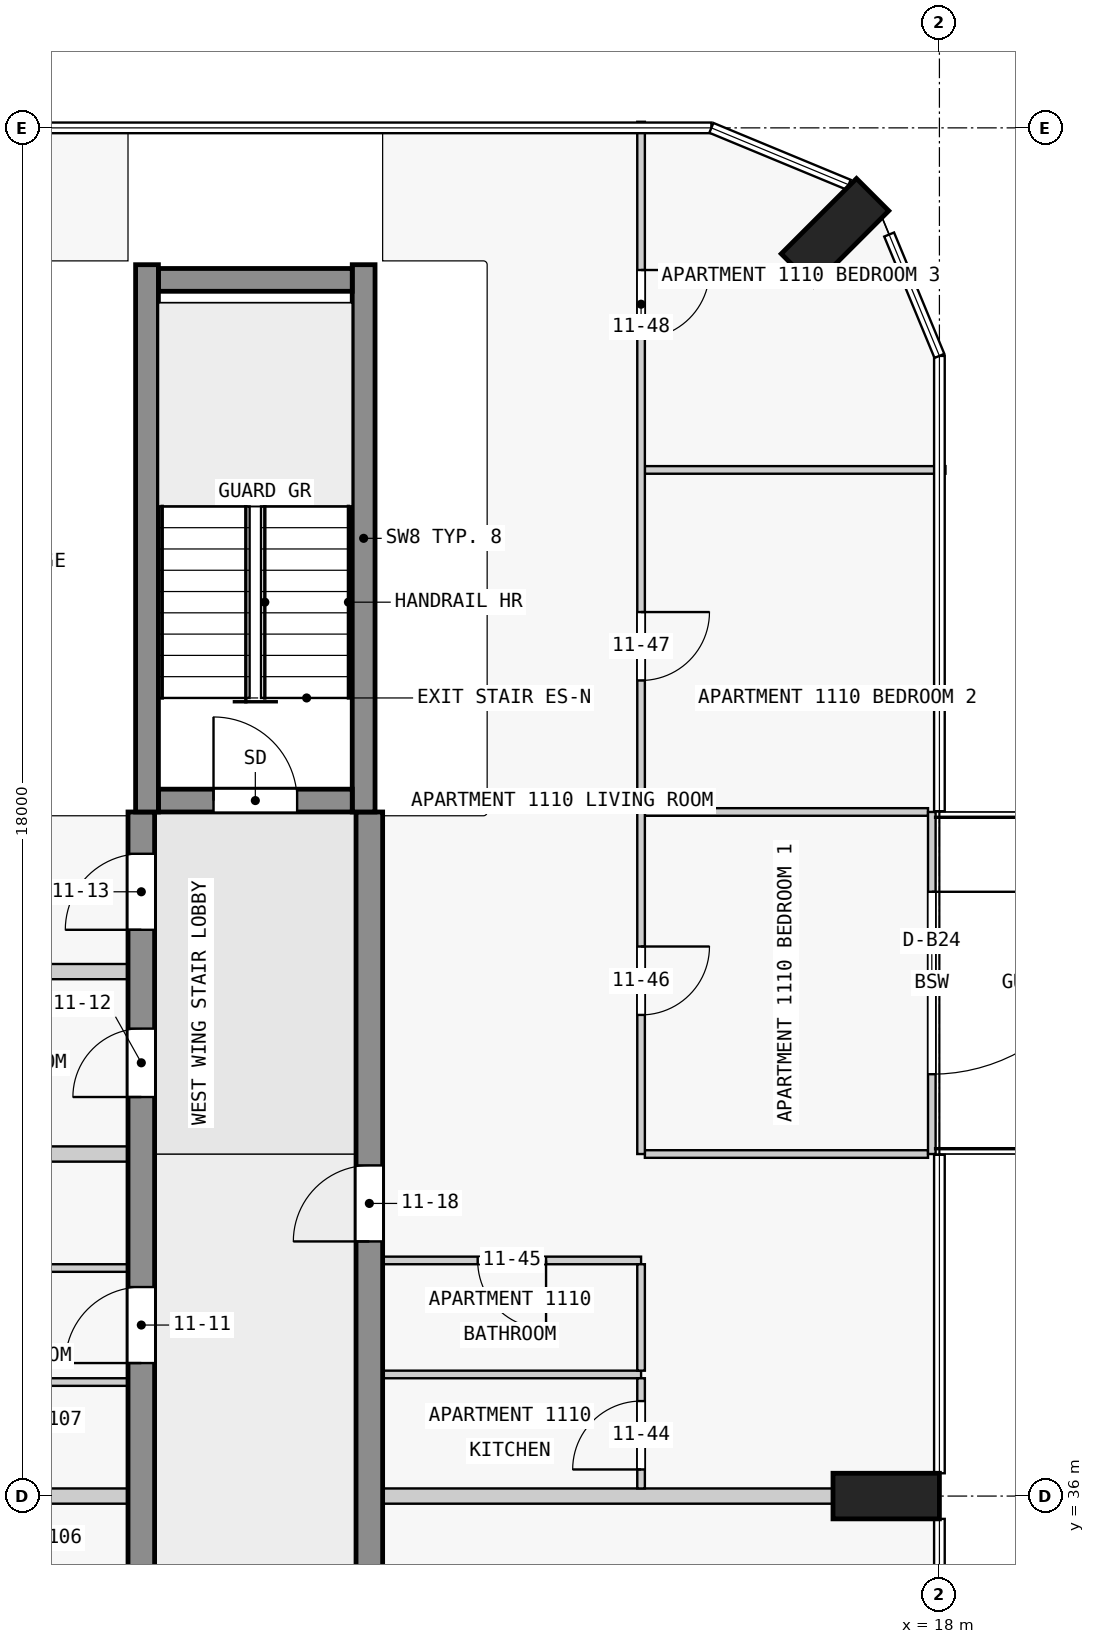
"""IFC4 building model, lengths in metres.
Left out: names, types, materials, properties, quantities, classifications, styles, units other than length and angle.
Written with IfcOpenShell. Run it as: python <this file> out.ifc"""

import sys

from ifc_helpers import new_model, si_unit, direction, frame, frame_2d, origin, origin_2d, place, context, subcontext, project, spatial, rectangle, extrude, element, fill, save


model = new_model("IFC4")
c1 = context("Model", 3, precision=1e-05, world=origin(), true_north=direction((0.0, 1.0)))
c2 = subcontext(c1, "Body", "Model", "MODEL_VIEW")
j1 = project(units=[si_unit("LENGTHUNIT", "METRE"), si_unit("PLANEANGLEUNIT", "RADIAN")], contexts=[c1])
p1 = place(None, origin())
s1 = spatial("IfcSite", under=j1, at=p1, CompositionType="ELEMENT")
p2 = place(p1, origin())
s2 = spatial("IfcBuilding", under=s1, at=p2, CompositionType="ELEMENT")
p3 = place(p2, frame((0.0, 0.0, 47.8)))
s3 = spatial("IfcBuildingStorey", under=s2, at=p3, CompositionType="ELEMENT", Elevation=47.8)
for number, where, z_axis, x_axis in (
    (1, (17.3, 36.0, 0.0), (0.0, 0.0, 1.0), (0.0, 1.0, 0.0)),
    (2, (16.626, 52.626, 0.0), (0.0, 0.0, 1.0), (-0.707, 0.707, 0.0)),
):
    element("IfcColumn", number, at=place(p3, frame(where, z_axis=z_axis, x_axis=x_axis)), inside=s3, PredefinedType="COLUMN", context=c2, shape_type="SweptSolid", body=[
        extrude(rectangle(XDim=0.6, YDim=1.4, at=origin_2d()), origin(), (0.0, 0.0, 1.0), 3.5),
    ])
p4 = place(p3, frame((7.725, 45.15, 0.0), z_axis=(0.0, 0.0, 1.0), x_axis=(1.0, 0.0, 0.0)))
e3 = element("IfcWall", 3, at=p4, inside=s3, PredefinedType="SHEAR", context=c2, shape_type="SweptSolid", body=[
    extrude(rectangle(XDim=2.55, YDim=0.3, at=frame_2d((1.275, 0.0))), origin(), (0.0, 0.0, 1.0), 3.5),
])
p5 = place(p4, frame((0.725, 0.0, 0.0)))
e4 = element("IfcOpeningElement", 4, at=p5, cuts=e3, PredefinedType="OPENING", context=c2, shape_type="SweptSolid", body=[
    extrude(rectangle(XDim=1.1, YDim=2.1, at=frame_2d((0.55, 1.05))), frame((0.0, 0.16, 0.0), z_axis=(0.0, -1.0, 0.0), x_axis=(1.0, 0.0, 0.0)), (0.0, 0.0, 1.0), 0.32),
])
p6 = place(p3, frame((7.725, 52.0, 0.0), z_axis=(0.0, 0.0, 1.0), x_axis=(1.0, 0.0, 0.0)))
e5 = element("IfcWall", 5, at=p6, inside=s3, PredefinedType="SHEAR", context=c2, shape_type="SweptSolid", body=[
    extrude(rectangle(XDim=2.55, YDim=0.3, at=frame_2d((1.275, 0.0))), origin(), (0.0, 0.0, 1.0), 3.5),
])
for number, where, z_axis, x_axis in (
    (6, (7.575, 45.0, 0.0), (0.0, 0.0, 1.0), (0.0, 1.0, 0.0)),
    (7, (10.425, 45.0, 0.0), (0.0, 0.0, 1.0), (0.0, 1.0, 0.0)),
):
    element("IfcWall", number, at=place(p3, frame(where, z_axis=z_axis, x_axis=x_axis)), inside=s3, PredefinedType="SHEAR", context=c2, shape_type="SweptSolid", body=[
        extrude(rectangle(XDim=7.2, YDim=0.3, at=frame_2d((3.6, 0.0))), origin(), (0.0, 0.0, 1.0), 3.5),
    ])
p7 = place(p3, frame((7.5, 18.0, 0.0), z_axis=(0.0, 0.0, 1.0), x_axis=(0.0, 1.0, 0.0)))
e8 = element("IfcWall", 8, at=p7, inside=s3, PredefinedType="SHEAR", context=c2, shape_type="SweptSolid", body=[
    extrude(rectangle(XDim=27.0, YDim=0.35, at=frame_2d((13.5, 0.0))), origin(), (0.0, 0.0, 1.0), 3.25),
])
p8 = place(p7, frame((4.75, 0.0, 0.0)))
e9 = element("IfcOpeningElement", 9, at=p8, cuts=e8, PredefinedType="OPENING", context=c2, shape_type="SweptSolid", body=[
    extrude(rectangle(XDim=1.0, YDim=2.1, at=frame_2d((0.5, 1.05))), frame((0.0, 0.185, 0.0), z_axis=(0.0, -1.0, 0.0), x_axis=(1.0, 0.0, 0.0)), (0.0, 0.0, 1.0), 0.37),
])
p9 = place(p7, frame((15.25, 0.0, 0.0)))
e10 = element("IfcOpeningElement", 10, at=p9, cuts=e8, PredefinedType="OPENING", context=c2, shape_type="SweptSolid", body=[
    extrude(rectangle(XDim=1.0, YDim=2.1, at=frame_2d((0.5, 1.05))), frame((0.0, 0.185, 0.0), z_axis=(0.0, -1.0, 0.0), x_axis=(1.0, 0.0, 0.0)), (0.0, 0.0, 1.0), 0.37),
])
p10 = place(p7, frame((19.75, 0.0, 0.0)))
e11 = element("IfcOpeningElement", 11, at=p10, cuts=e8, PredefinedType="OPENING", context=c2, shape_type="SweptSolid", body=[
    extrude(rectangle(XDim=1.0, YDim=2.1, at=frame_2d((0.5, 1.05))), frame((0.0, 0.185, 0.0), z_axis=(0.0, -1.0, 0.0), x_axis=(1.0, 0.0, 0.0)), (0.0, 0.0, 1.0), 0.37),
])
p11 = place(p7, frame((23.25, 0.0, 0.0)))
e12 = element("IfcOpeningElement", 12, at=p11, cuts=e8, PredefinedType="OPENING", context=c2, shape_type="SweptSolid", body=[
    extrude(rectangle(XDim=0.9, YDim=2.1, at=frame_2d((0.45, 1.05))), frame((0.0, 0.185, 0.0), z_axis=(0.0, -1.0, 0.0), x_axis=(1.0, 0.0, 0.0)), (0.0, 0.0, 1.0), 0.37),
])
p12 = place(p7, frame((25.45, 0.0, 0.0)))
e13 = element("IfcOpeningElement", 13, at=p12, cuts=e8, PredefinedType="OPENING", context=c2, shape_type="SweptSolid", body=[
    extrude(rectangle(XDim=1.0, YDim=2.1, at=frame_2d((0.5, 1.05))), frame((0.0, 0.185, 0.0), z_axis=(0.0, -1.0, 0.0), x_axis=(1.0, 0.0, 0.0)), (0.0, 0.0, 1.0), 0.37),
])
p13 = place(p3, frame((10.5, 18.0, 0.0), z_axis=(0.0, 0.0, 1.0), x_axis=(0.0, 1.0, 0.0)))
e14 = element("IfcWall", 14, at=p13, inside=s3, PredefinedType="SHEAR", context=c2, shape_type="SweptSolid", body=[
    extrude(rectangle(XDim=27.0, YDim=0.35, at=frame_2d((13.5, 0.0))), origin(), (0.0, 0.0, 1.0), 3.25),
])
p14 = place(p13, frame((1.75, 0.0, 0.0)))
e15 = element("IfcOpeningElement", 15, at=p14, cuts=e14, PredefinedType="OPENING", context=c2, shape_type="SweptSolid", body=[
    extrude(rectangle(XDim=1.0, YDim=2.1, at=frame_2d((0.5, 1.05))), frame((0.0, 0.185, 0.0), z_axis=(0.0, -1.0, 0.0), x_axis=(1.0, 0.0, 0.0)), (0.0, 0.0, 1.0), 0.37),
])
p15 = place(p13, frame((6.25, 0.0, 0.0)))
e16 = element("IfcOpeningElement", 16, at=p15, cuts=e14, PredefinedType="OPENING", context=c2, shape_type="SweptSolid", body=[
    extrude(rectangle(XDim=1.0, YDim=2.1, at=frame_2d((0.5, 1.05))), frame((0.0, 0.185, 0.0), z_axis=(0.0, -1.0, 0.0), x_axis=(1.0, 0.0, 0.0)), (0.0, 0.0, 1.0), 0.37),
])
p16 = place(p13, frame((10.75, 0.0, 0.0)))
e17 = element("IfcOpeningElement", 17, at=p16, cuts=e14, PredefinedType="OPENING", context=c2, shape_type="SweptSolid", body=[
    extrude(rectangle(XDim=1.0, YDim=2.1, at=frame_2d((0.5, 1.05))), frame((0.0, 0.185, 0.0), z_axis=(0.0, -1.0, 0.0), x_axis=(1.0, 0.0, 0.0)), (0.0, 0.0, 1.0), 0.37),
])
p17 = place(p13, frame((15.25, 0.0, 0.0)))
e18 = element("IfcOpeningElement", 18, at=p17, cuts=e14, PredefinedType="OPENING", context=c2, shape_type="SweptSolid", body=[
    extrude(rectangle(XDim=1.0, YDim=2.1, at=frame_2d((0.5, 1.05))), frame((0.0, 0.185, 0.0), z_axis=(0.0, -1.0, 0.0), x_axis=(1.0, 0.0, 0.0)), (0.0, 0.0, 1.0), 0.37),
])
p18 = place(p13, frame((21.35, 0.0, 0.0)))
e19 = element("IfcOpeningElement", 19, at=p18, cuts=e14, PredefinedType="OPENING", context=c2, shape_type="SweptSolid", body=[
    extrude(rectangle(XDim=1.0, YDim=2.1, at=frame_2d((0.5, 1.05))), frame((0.0, 0.185, 0.0), z_axis=(0.0, -1.0, 0.0), x_axis=(1.0, 0.0, 0.0)), (0.0, 0.0, 1.0), 0.37),
])
p19 = place(p3, frame((17.9, 45.0, 0.0), z_axis=(0.0, 0.0, 1.0), x_axis=(0.0, -1.0, 0.0)))
e20 = element("IfcWall", 20, at=p19, inside=s3, PredefinedType="STANDARD", context=c2, shape_type="SweptSolid", body=[
    extrude(rectangle(XDim=4.5, YDim=0.1, at=frame_2d((2.25, 0.0))), origin(), (0.0, 0.0, 1.0), 3.25),
])
p20 = place(p19, frame((1.05, 0.0, 0.0)))
e21 = element("IfcOpeningElement", 21, at=p20, cuts=e20, PredefinedType="OPENING", context=c2, shape_type="SweptSolid", body=[
    extrude(rectangle(XDim=2.4, YDim=2.4, at=frame_2d((1.2, 1.2))), frame((0.0, 0.06, 0.0), z_axis=(0.0, -1.0, 0.0), x_axis=(1.0, 0.0, 0.0)), (0.0, 0.0, 1.0), 0.12),
])
p21 = place(p3, frame((7.325, 36.0, 0.0), z_axis=(0.0, 0.0, 1.0), x_axis=(-1.0, 0.0, 0.0)))
e22 = element("IfcWall", 22, at=p21, inside=s3, PredefinedType="PARTITIONING", context=c2, shape_type="SweptSolid", body=[
    extrude(rectangle(XDim=3.4, YDim=0.2, at=frame_2d((1.7, 0.0))), origin(), (0.0, 0.0, 1.0), 3.25),
])
p22 = place(p3, frame((16.6, 36.0, 0.0), z_axis=(0.0, 0.0, 1.0), x_axis=(-1.0, 0.0, 0.0)))
e23 = element("IfcWall", 23, at=p22, inside=s3, PredefinedType="PARTITIONING", context=c2, shape_type="SweptSolid", body=[
    extrude(rectangle(XDim=5.925, YDim=0.2, at=frame_2d((2.962, 0.0))), origin(), (0.0, 0.0, 1.0), 3.25),
])
p23 = place(p3, frame((7.325, 37.5, 0.0), z_axis=(0.0, 0.0, 1.0), x_axis=(-1.0, 0.0, 0.0)))
e24 = element("IfcWall", 24, at=p23, inside=s3, PredefinedType="PARTITIONING", context=c2, shape_type="SweptSolid", body=[
    extrude(rectangle(XDim=3.4, YDim=0.1, at=frame_2d((1.7, 0.0))), origin(), (0.0, 0.0, 1.0), 3.25),
])
p24 = place(p23, frame((1.25, 0.0, 0.0)))
e25 = element("IfcOpeningElement", 25, at=p24, cuts=e24, PredefinedType="OPENING", context=c2, shape_type="SweptSolid", body=[
    extrude(rectangle(XDim=0.9, YDim=2.1, at=frame_2d((0.45, 1.05))), frame((0.0, 0.06, 0.0), z_axis=(0.0, -1.0, 0.0), x_axis=(1.0, 0.0, 0.0)), (0.0, 0.0, 1.0), 0.12),
])
p25 = place(p3, frame((14.075, 37.6, 0.0), z_axis=(0.0, 0.0, 1.0), x_axis=(-1.0, 0.0, 0.0)))
e26 = element("IfcWall", 26, at=p25, inside=s3, PredefinedType="PARTITIONING", context=c2, shape_type="SweptSolid", body=[
    extrude(rectangle(XDim=3.4, YDim=0.1, at=frame_2d((1.7, 0.0))), origin(), (0.0, 0.0, 1.0), 3.25),
])
p26 = place(p3, frame((3.925, 39.0, 0.0), z_axis=(0.0, 0.0, 1.0), x_axis=(1.0, 0.0, 0.0)))
e27 = element("IfcWall", 27, at=p26, inside=s3, PredefinedType="PARTITIONING", context=c2, shape_type="SweptSolid", body=[
    extrude(rectangle(XDim=3.4, YDim=0.1, at=frame_2d((1.7, 0.0))), origin(), (0.0, 0.0, 1.0), 3.25),
])
p27 = place(p26, frame((1.25, 0.0, 0.0)))
e28 = element("IfcOpeningElement", 28, at=p27, cuts=e27, PredefinedType="OPENING", context=c2, shape_type="SweptSolid", body=[
    extrude(rectangle(XDim=0.9, YDim=2.1, at=frame_2d((0.45, 1.05))), frame((0.0, 0.06, 0.0), z_axis=(0.0, -1.0, 0.0), x_axis=(1.0, 0.0, 0.0)), (0.0, 0.0, 1.0), 0.12),
])
p28 = place(p3, frame((14.075, 39.1, 0.0), z_axis=(0.0, 0.0, 1.0), x_axis=(-1.0, 0.0, 0.0)))
e29 = element("IfcWall", 29, at=p28, inside=s3, PredefinedType="PARTITIONING", context=c2, shape_type="SweptSolid", body=[
    extrude(rectangle(XDim=3.4, YDim=0.1, at=frame_2d((1.7, 0.0))), origin(), (0.0, 0.0, 1.0), 3.25),
])
p29 = place(p28, frame((1.25, 0.0, 0.0)))
e30 = element("IfcOpeningElement", 30, at=p29, cuts=e29, PredefinedType="OPENING", context=c2, shape_type="SweptSolid", body=[
    extrude(rectangle(XDim=0.9, YDim=2.1, at=frame_2d((0.45, 1.05))), frame((0.0, 0.06, 0.0), z_axis=(0.0, -1.0, 0.0), x_axis=(1.0, 0.0, 0.0)), (0.0, 0.0, 1.0), 0.12),
])
p30 = place(p3, frame((14.125, 40.5, 0.0), z_axis=(0.0, 0.0, 1.0), x_axis=(1.0, 0.0, 0.0)))
e31 = element("IfcWall", 31, at=p30, inside=s3, PredefinedType="PARTITIONING", context=c2, shape_type="SweptSolid", body=[
    extrude(rectangle(XDim=3.725, YDim=0.1, at=frame_2d((1.863, 0.0))), origin(), (0.0, 0.0, 1.0), 3.25),
])
p31 = place(p3, frame((7.325, 40.5, 0.0), z_axis=(0.0, 0.0, 1.0), x_axis=(-1.0, 0.0, 0.0)))
e32 = element("IfcWall", 32, at=p31, inside=s3, PredefinedType="PARTITIONING", context=c2, shape_type="SweptSolid", body=[
    extrude(rectangle(XDim=3.3, YDim=0.2, at=frame_2d((1.65, 0.0))), origin(), (0.0, 0.0, 1.0), 3.25),
])
p32 = place(p3, frame((7.325, 42.9, 0.0), z_axis=(0.0, 0.0, 1.0), x_axis=(-1.0, 0.0, 0.0)))
e33 = element("IfcWall", 33, at=p32, inside=s3, PredefinedType="PARTITIONING", context=c2, shape_type="SweptSolid", body=[
    extrude(rectangle(XDim=3.4, YDim=0.2, at=frame_2d((1.7, 0.0))), origin(), (0.0, 0.0, 1.0), 3.25),
])
p33 = place(p3, frame((17.85, 45.0, 0.0), z_axis=(0.0, 0.0, 1.0), x_axis=(-1.0, 0.0, 0.0)))
e34 = element("IfcWall", 34, at=p33, inside=s3, PredefinedType="PARTITIONING", context=c2, shape_type="SweptSolid", body=[
    extrude(rectangle(XDim=3.725, YDim=0.1, at=frame_2d((1.863, 0.0))), origin(), (0.0, 0.0, 1.0), 3.25),
])
p34 = place(p3, frame((18.08, 49.5, 0.0), z_axis=(0.0, 0.0, 1.0), x_axis=(-1.0, 0.0, 0.0)))
e35 = element("IfcWall", 35, at=p34, inside=s3, PredefinedType="PARTITIONING", context=c2, shape_type="SweptSolid", body=[
    extrude(rectangle(XDim=3.955, YDim=0.1, at=frame_2d((1.978, 0.0))), origin(), (0.0, 0.0, 1.0), 3.25),
])
p35 = place(p3, frame((14.075, 54.08, 0.0), z_axis=(0.0, 0.0, 1.0), x_axis=(0.0, -1.0, 0.0)))
e36 = element("IfcWall", 36, at=p35, inside=s3, PredefinedType="PARTITIONING", context=c2, shape_type="SweptSolid", body=[
    extrude(rectangle(XDim=13.58, YDim=0.1, at=frame_2d((6.79, 0.0))), origin(), (0.0, 0.0, 1.0), 3.25),
])
p36 = place(p35, frame((10.85, 0.0, 0.0)))
e37 = element("IfcOpeningElement", 37, at=p36, cuts=e36, PredefinedType="OPENING", context=c2, shape_type="SweptSolid", body=[
    extrude(rectangle(XDim=0.9, YDim=2.1, at=frame_2d((0.45, 1.05))), frame((0.0, 0.06, 0.0), z_axis=(0.0, -1.0, 0.0), x_axis=(1.0, 0.0, 0.0)), (0.0, 0.0, 1.0), 0.12),
])
p37 = place(p35, frame((6.45, 0.0, 0.0)))
e38 = element("IfcOpeningElement", 38, at=p37, cuts=e36, PredefinedType="OPENING", context=c2, shape_type="SweptSolid", body=[
    extrude(rectangle(XDim=0.9, YDim=2.1, at=frame_2d((0.45, 1.05))), frame((0.0, 0.06, 0.0), z_axis=(0.0, -1.0, 0.0), x_axis=(1.0, 0.0, 0.0)), (0.0, 0.0, 1.0), 0.12),
])
p38 = place(p35, frame((1.95, 0.0, 0.0)))
e39 = element("IfcOpeningElement", 39, at=p38, cuts=e36, PredefinedType="OPENING", context=c2, shape_type="SweptSolid", body=[
    extrude(rectangle(XDim=0.9, YDim=2.1, at=frame_2d((0.45, 1.05))), frame((0.0, 0.06, 0.0), z_axis=(0.0, -1.0, 0.0), x_axis=(1.0, 0.0, 0.0)), (0.0, 0.0, 1.0), 0.12),
])
p39 = place(p3, frame((14.075, 36.1, 0.0), z_axis=(0.0, 0.0, 1.0), x_axis=(0.0, 1.0, 0.0)))
e40 = element("IfcWall", 40, at=p39, inside=s3, PredefinedType="PARTITIONING", context=c2, shape_type="SweptSolid", body=[
    extrude(rectangle(XDim=1.45, YDim=0.1, at=frame_2d((0.725, 0.0))), origin(), (0.0, 0.0, 1.0), 3.25),
])
p40 = place(p39, frame((0.25, 0.0, 0.0)))
e41 = element("IfcOpeningElement", 41, at=p40, cuts=e40, PredefinedType="OPENING", context=c2, shape_type="SweptSolid", body=[
    extrude(rectangle(XDim=0.9, YDim=2.1, at=frame_2d((0.45, 1.05))), frame((0.0, 0.06, 0.0), z_axis=(0.0, -1.0, 0.0), x_axis=(1.0, 0.0, 0.0)), (0.0, 0.0, 1.0), 0.12),
])
p41 = place(p3, frame((14.075, 37.65, 0.0), z_axis=(0.0, 0.0, 1.0), x_axis=(0.0, 1.0, 0.0)))
e42 = element("IfcWall", 42, at=p41, inside=s3, PredefinedType="PARTITIONING", context=c2, shape_type="SweptSolid", body=[
    extrude(rectangle(XDim=1.4, YDim=0.1, at=frame_2d((0.7, 0.0))), origin(), (0.0, 0.0, 1.0), 3.25),
])
p42 = place(p20, origin())
e43 = element("IfcDoor", 43, at=p42, inside=s3, OperationType="SINGLE_SWING_LEFT", PredefinedType="DOOR", context=c2, shape_type="SweptSolid", body=[
    extrude(rectangle(XDim=2.4, YDim=2.4, at=frame_2d((1.2, 1.2))), frame((0.0, 0.025, 0.0), z_axis=(0.0, -1.0, 0.0), x_axis=(1.0, 0.0, 0.0)), (0.0, 0.0, 1.0), 0.05),
])
fill(e21, e43)
p43 = place(p5, origin())
e44 = element("IfcDoor", 44, at=p43, inside=s3, OperationType="SINGLE_SWING_LEFT", PredefinedType="DOOR", context=c2, shape_type="SweptSolid", body=[
    extrude(rectangle(XDim=1.1, YDim=2.1, at=frame_2d((0.55, 1.05))), frame((0.0, 0.025, 0.0), z_axis=(0.0, -1.0, 0.0), x_axis=(1.0, 0.0, 0.0)), (0.0, 0.0, 1.0), 0.05),
])
fill(e4, e44)
p44 = place(p10, origin())
e45 = element("IfcDoor", 45, at=p44, inside=s3, OperationType="SINGLE_SWING_RIGHT", PredefinedType="DOOR", context=c2, shape_type="SweptSolid", body=[
    extrude(rectangle(XDim=1.0, YDim=2.1, at=frame_2d((0.5, 1.05))), frame((0.0, 0.025, 0.0), z_axis=(0.0, -1.0, 0.0), x_axis=(1.0, 0.0, 0.0)), (0.0, 0.0, 1.0), 0.05),
])
fill(e11, e45)
p45 = place(p11, origin())
e46 = element("IfcDoor", 46, at=p45, inside=s3, OperationType="SINGLE_SWING_RIGHT", PredefinedType="DOOR", context=c2, shape_type="SweptSolid", body=[
    extrude(rectangle(XDim=0.9, YDim=2.1, at=frame_2d((0.45, 1.05))), frame((0.0, 0.025, 0.0), z_axis=(0.0, -1.0, 0.0), x_axis=(1.0, 0.0, 0.0)), (0.0, 0.0, 1.0), 0.05),
])
fill(e12, e46)
p46 = place(p12, origin())
e47 = element("IfcDoor", 47, at=p46, inside=s3, OperationType="SINGLE_SWING_RIGHT", PredefinedType="DOOR", context=c2, shape_type="SweptSolid", body=[
    extrude(rectangle(XDim=1.0, YDim=2.1, at=frame_2d((0.5, 1.05))), frame((0.0, 0.025, 0.0), z_axis=(0.0, -1.0, 0.0), x_axis=(1.0, 0.0, 0.0)), (0.0, 0.0, 1.0), 0.05),
])
fill(e13, e47)
p47 = place(p18, origin())
e48 = element("IfcDoor", 48, at=p47, inside=s3, OperationType="SINGLE_SWING_RIGHT", PredefinedType="DOOR", context=c2, shape_type="SweptSolid", body=[
    extrude(rectangle(XDim=1.0, YDim=2.1, at=frame_2d((0.5, 1.05))), frame((0.0, 0.025, 0.0), z_axis=(0.0, -1.0, 0.0), x_axis=(1.0, 0.0, 0.0)), (0.0, 0.0, 1.0), 0.05),
])
fill(e19, e48)
p48 = place(p40, origin())
e49 = element("IfcDoor", 49, at=p48, inside=s3, OperationType="SINGLE_SWING_LEFT", PredefinedType="DOOR", context=c2, shape_type="SweptSolid", body=[
    extrude(rectangle(XDim=0.9, YDim=2.1, at=frame_2d((0.45, 1.05))), frame((0.0, 0.025, 0.0), z_axis=(0.0, -1.0, 0.0), x_axis=(1.0, 0.0, 0.0)), (0.0, 0.0, 1.0), 0.05),
])
fill(e41, e49)
p49 = place(p29, origin())
e50 = element("IfcDoor", 50, at=p49, inside=s3, OperationType="SINGLE_SWING_RIGHT", PredefinedType="DOOR", context=c2, shape_type="SweptSolid", body=[
    extrude(rectangle(XDim=0.9, YDim=2.1, at=frame_2d((0.45, 1.05))), frame((0.0, 0.025, 0.0), z_axis=(0.0, -1.0, 0.0), x_axis=(1.0, 0.0, 0.0)), (0.0, 0.0, 1.0), 0.05),
])
fill(e30, e50)
p50 = place(p36, origin())
e51 = element("IfcDoor", 51, at=p50, inside=s3, OperationType="SINGLE_SWING_RIGHT", PredefinedType="DOOR", context=c2, shape_type="SweptSolid", body=[
    extrude(rectangle(XDim=0.9, YDim=2.1, at=frame_2d((0.45, 1.05))), frame((0.0, 0.025, 0.0), z_axis=(0.0, -1.0, 0.0), x_axis=(1.0, 0.0, 0.0)), (0.0, 0.0, 1.0), 0.05),
])
fill(e37, e51)
p51 = place(p37, origin())
e52 = element("IfcDoor", 52, at=p51, inside=s3, OperationType="SINGLE_SWING_RIGHT", PredefinedType="DOOR", context=c2, shape_type="SweptSolid", body=[
    extrude(rectangle(XDim=0.9, YDim=2.1, at=frame_2d((0.45, 1.05))), frame((0.0, 0.025, 0.0), z_axis=(0.0, -1.0, 0.0), x_axis=(1.0, 0.0, 0.0)), (0.0, 0.0, 1.0), 0.05),
])
fill(e38, e52)
p52 = place(p38, origin())
e53 = element("IfcDoor", 53, at=p52, inside=s3, OperationType="SINGLE_SWING_LEFT", PredefinedType="DOOR", context=c2, shape_type="SweptSolid", body=[
    extrude(rectangle(XDim=0.9, YDim=2.1, at=frame_2d((0.45, 1.05))), frame((0.0, 0.025, 0.0), z_axis=(0.0, -1.0, 0.0), x_axis=(1.0, 0.0, 0.0)), (0.0, 0.0, 1.0), 0.05),
])
fill(e39, e53)
save(model, sys.argv[1])
